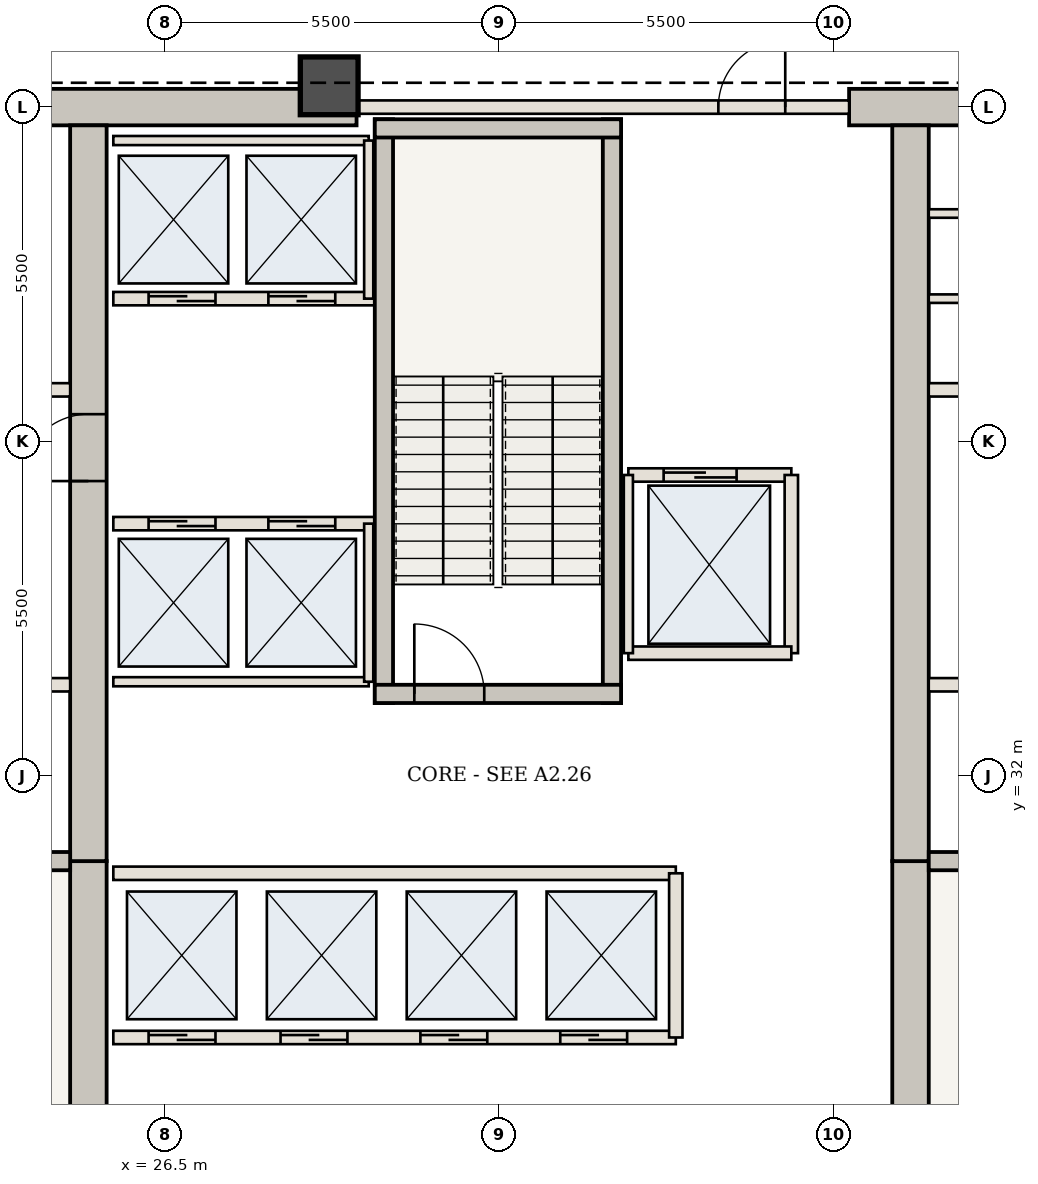
"""IFC4 building model, lengths in metres.
Left out: names, types, materials, properties, quantities, classifications, styles, units other than length and angle.
Written with IfcOpenShell. Run it as: python <this file> out.ifc"""

import sys

from ifc_helpers import new_model, si_unit, direction, frame, frame_2d, origin, origin_2d, place, context, subcontext, project, spatial, rectangle, extrude, element, fill, save


model = new_model("IFC4")
c1 = context("Model", 3, precision=1e-05, world=origin(), true_north=direction((0.0, 1.0)))
c2 = subcontext(c1, "Body", "Model", "MODEL_VIEW")
j1 = project(units=[si_unit("LENGTHUNIT", "METRE"), si_unit("PLANEANGLEUNIT", "RADIAN")], contexts=[c1])
p1 = place(None, origin())
s1 = spatial("IfcSite", under=j1, at=p1, CompositionType="ELEMENT")
p2 = place(p1, origin())
s2 = spatial("IfcBuilding", under=s1, at=p2, CompositionType="ELEMENT")
p3 = place(p2, frame((0.0, 0.0, 106.05)))
s3 = spatial("IfcBuildingStorey", under=s2, at=p3, CompositionType="ELEMENT", Elevation=106.05)
p4 = place(p3, frame((21.41, 43.0, 0.0), z_axis=(0.0, 0.0, 1.0), x_axis=(1.0, 0.0, 0.0)))
e1 = element("IfcWall", 1, at=p4, inside=s3, PredefinedType="SHEAR", context=c2, shape_type="SweptSolid", body=[
    extrude(rectangle(XDim=8.24, YDim=0.6, at=frame_2d((4.12, 0.0))), origin(), (0.0, 0.0, 1.0), 4.55),
])
p5 = place(p3, frame((37.75, 43.0, 0.0), z_axis=(0.0, 0.0, 1.0), x_axis=(1.0, 0.0, 0.0)))
e2 = element("IfcWall", 2, at=p5, inside=s3, PredefinedType="SHEAR", context=c2, shape_type="SweptSolid", body=[
    extrude(rectangle(XDim=4.84, YDim=0.6, at=frame_2d((2.42, 0.0))), origin(), (0.0, 0.0, 1.0), 4.55),
])
p6 = place(p3, frame((25.24, 21.25, 0.0), z_axis=(0.0, 0.0, 1.0), x_axis=(0.0, 1.0, 0.0)))
e3 = element("IfcWall", 3, at=p6, inside=s3, PredefinedType="SHEAR", context=c2, shape_type="SweptSolid", body=[
    extrude(rectangle(XDim=9.35, YDim=0.6, at=frame_2d((4.675, 0.0))), origin(), (0.0, 0.0, 1.0), 4.55),
])
p7 = place(p3, frame((25.24, 30.6, 0.0), z_axis=(0.0, 0.0, 1.0), x_axis=(0.0, 1.0, 0.0)))
e4 = element("IfcWall", 4, at=p7, inside=s3, PredefinedType="SHEAR", context=c2, shape_type="SweptSolid", body=[
    extrude(rectangle(XDim=12.1, YDim=0.6, at=frame_2d((6.05, 0.0))), origin(), (0.0, 0.0, 1.0), 4.55),
])
p8 = place(p7, frame((6.25, 0.0, 0.0)))
e5 = element("IfcOpeningElement", 5, at=p8, cuts=e4, PredefinedType="OPENING", context=c2, shape_type="SweptSolid", body=[
    extrude(rectangle(XDim=1.1, YDim=2.15, at=frame_2d((0.55, 1.075))), frame((0.0, 0.31, 0.0), z_axis=(0.0, -1.0, 0.0), x_axis=(1.0, 0.0, 0.0)), (0.0, 0.0, 1.0), 0.62),
])
p9 = place(p3, frame((38.76, 21.25, 0.0), z_axis=(0.0, 0.0, 1.0), x_axis=(0.0, 1.0, 0.0)))
e6 = element("IfcWall", 6, at=p9, inside=s3, PredefinedType="SHEAR", context=c2, shape_type="SweptSolid", body=[
    extrude(rectangle(XDim=9.35, YDim=0.6, at=frame_2d((4.675, 0.0))), origin(), (0.0, 0.0, 1.0), 4.55),
])
p10 = place(p3, frame((38.76, 30.6, 0.0), z_axis=(0.0, 0.0, 1.0), x_axis=(0.0, 1.0, 0.0)))
e7 = element("IfcWall", 7, at=p10, inside=s3, PredefinedType="SHEAR", context=c2, shape_type="SweptSolid", body=[
    extrude(rectangle(XDim=12.1, YDim=0.6, at=frame_2d((6.05, 0.0))), origin(), (0.0, 0.0, 1.0), 4.55),
])
p11 = place(p3, frame((29.2, 43.35, 0.0), z_axis=(0.0, 0.0, 1.0), x_axis=(1.0, 0.0, 0.0)))
e8 = element("IfcColumn", 8, at=p11, inside=s3, PredefinedType="COLUMN", context=c2, shape_type="SweptSolid", body=[
    extrude(rectangle(XDim=0.95, YDim=0.95, at=origin_2d()), origin(), (0.0, 0.0, 1.0), 4.55),
])
for number, where, z_axis, x_axis in (
    (9, (21.41, 30.6, 0.0), (0.0, 0.0, 1.0), (1.0, 0.0, 0.0)),
    (10, (39.06, 30.6, 0.0), (0.0, 0.0, 1.0), (1.0, 0.0, 0.0)),
):
    element("IfcWall", number, at=place(p3, frame(where, z_axis=z_axis, x_axis=x_axis)), inside=s3, PredefinedType="SHEAR", context=c2, shape_type="SweptSolid", body=[
        extrude(rectangle(XDim=3.53, YDim=0.3, at=frame_2d((1.765, 0.0))), origin(), (0.0, 0.0, 1.0), 4.13),
    ])
p12 = place(p3, frame((21.41, 33.5, 0.0), z_axis=(0.0, 0.0, 1.0), x_axis=(1.0, 0.0, 0.0)))
e11 = element("IfcWall", 11, at=p12, inside=s3, PredefinedType="STANDARD", context=c2, shape_type="SweptSolid", body=[
    extrude(rectangle(XDim=3.53, YDim=0.22, at=frame_2d((1.765, 0.0))), origin(), (0.0, 0.0, 1.0), 4.13),
])
p13 = place(p12, frame((0.75, 0.0, 0.0)))
e12 = element("IfcOpeningElement", 12, at=p13, cuts=e11, PredefinedType="OPENING", context=c2, shape_type="SweptSolid", body=[
    extrude(rectangle(XDim=1.2, YDim=2.2, at=frame_2d((0.6, 1.1))), frame((0.0, 0.12, 0.0), z_axis=(0.0, -1.0, 0.0), x_axis=(1.0, 0.0, 0.0)), (0.0, 0.0, 1.0), 0.24),
])
p14 = place(p3, frame((39.06, 33.5, 0.0), z_axis=(0.0, 0.0, 1.0), x_axis=(1.0, 0.0, 0.0)))
e13 = element("IfcWall", 13, at=p14, inside=s3, PredefinedType="STANDARD", context=c2, shape_type="SweptSolid", body=[
    extrude(rectangle(XDim=3.53, YDim=0.22, at=frame_2d((1.765, 0.0))), origin(), (0.0, 0.0, 1.0), 4.13),
])
p15 = place(p14, frame((1.55, 0.0, 0.0)))
e14 = element("IfcOpeningElement", 14, at=p15, cuts=e13, PredefinedType="OPENING", context=c2, shape_type="SweptSolid", body=[
    extrude(rectangle(XDim=1.2, YDim=2.2, at=frame_2d((0.6, 1.1))), frame((0.0, 0.12, 0.0), z_axis=(0.0, -1.0, 0.0), x_axis=(1.0, 0.0, 0.0)), (0.0, 0.0, 1.0), 0.24),
])
for number, where, z_axis, x_axis in (
    (15, (21.41, 38.35, 0.0), (0.0, 0.0, 1.0), (1.0, 0.0, 0.0)),
    (16, (39.06, 38.35, 0.0), (0.0, 0.0, 1.0), (1.0, 0.0, 0.0)),
):
    element("IfcWall", number, at=place(p3, frame(where, z_axis=z_axis, x_axis=x_axis)), inside=s3, PredefinedType="STANDARD", context=c2, shape_type="SweptSolid", body=[
        extrude(rectangle(XDim=3.53, YDim=0.22, at=frame_2d((1.765, 0.0))), origin(), (0.0, 0.0, 1.0), 4.13),
    ])
for number, where, z_axis, x_axis in (
    (17, (39.06, 39.85, 0.0), (0.0, 0.0, 1.0), (1.0, 0.0, 0.0)),
    (18, (39.06, 41.25, 0.0), (0.0, 0.0, 1.0), (1.0, 0.0, 0.0)),
):
    element("IfcWall", number, at=place(p3, frame(where, z_axis=z_axis, x_axis=x_axis)), inside=s3, PredefinedType="STANDARD", context=c2, shape_type="SweptSolid", body=[
        extrude(rectangle(XDim=3.53, YDim=0.14, at=frame_2d((1.765, 0.0))), origin(), (0.0, 0.0, 1.0), 4.13),
    ])
p16 = place(p3, frame((25.65, 27.7, 0.0), z_axis=(0.0, 0.0, 1.0), x_axis=(1.0, 0.0, 0.0)))
e19 = element("IfcWall", 19, at=p16, inside=s3, PredefinedType="STANDARD", context=c2, shape_type="SweptSolid", body=[
    extrude(rectangle(XDim=9.25, YDim=0.22, at=frame_2d((4.625, 0.0))), origin(), (0.0, 0.0, 1.0), 4.13),
])
p17 = place(p16, frame((0.58, 0.0, 0.0)))
e20 = element("IfcOpeningElement", 20, at=p17, cuts=e19, PredefinedType="OPENING", context=c2, shape_type="SweptSolid", body=[
    extrude(rectangle(XDim=1.1, YDim=2.15, at=frame_2d((0.55, 1.075))), frame((0.0, 0.12, 0.0), z_axis=(0.0, -1.0, 0.0), x_axis=(1.0, 0.0, 0.0)), (0.0, 0.0, 1.0), 0.24),
])
p18 = place(p16, frame((2.75, 0.0, 0.0)))
e21 = element("IfcOpeningElement", 21, at=p18, cuts=e19, PredefinedType="OPENING", context=c2, shape_type="SweptSolid", body=[
    extrude(rectangle(XDim=1.1, YDim=2.15, at=frame_2d((0.55, 1.075))), frame((0.0, 0.12, 0.0), z_axis=(0.0, -1.0, 0.0), x_axis=(1.0, 0.0, 0.0)), (0.0, 0.0, 1.0), 0.24),
])
p19 = place(p16, frame((5.05, 0.0, 0.0)))
e22 = element("IfcOpeningElement", 22, at=p19, cuts=e19, PredefinedType="OPENING", context=c2, shape_type="SweptSolid", body=[
    extrude(rectangle(XDim=1.1, YDim=2.15, at=frame_2d((0.55, 1.075))), frame((0.0, 0.12, 0.0), z_axis=(0.0, -1.0, 0.0), x_axis=(1.0, 0.0, 0.0)), (0.0, 0.0, 1.0), 0.24),
])
p20 = place(p16, frame((7.35, 0.0, 0.0)))
e23 = element("IfcOpeningElement", 23, at=p20, cuts=e19, PredefinedType="OPENING", context=c2, shape_type="SweptSolid", body=[
    extrude(rectangle(XDim=1.1, YDim=2.15, at=frame_2d((0.55, 1.075))), frame((0.0, 0.12, 0.0), z_axis=(0.0, -1.0, 0.0), x_axis=(1.0, 0.0, 0.0)), (0.0, 0.0, 1.0), 0.24),
])
p21 = place(p3, frame((25.65, 30.4, 0.0), z_axis=(0.0, 0.0, 1.0), x_axis=(1.0, 0.0, 0.0)))
e24 = element("IfcWall", 24, at=p21, inside=s3, PredefinedType="STANDARD", context=c2, shape_type="SweptSolid", body=[
    extrude(rectangle(XDim=9.25, YDim=0.22, at=frame_2d((4.625, 0.0))), origin(), (0.0, 0.0, 1.0), 4.13),
])
p22 = place(p3, frame((34.9, 27.7, 0.0), z_axis=(0.0, 0.0, 1.0), x_axis=(0.0, 1.0, 0.0)))
e25 = element("IfcWall", 25, at=p22, inside=s3, PredefinedType="STANDARD", context=c2, shape_type="SweptSolid", body=[
    extrude(rectangle(XDim=2.7, YDim=0.22, at=frame_2d((1.35, 0.0))), origin(), (0.0, 0.0, 1.0), 4.13),
])
p23 = place(p3, frame((25.65, 36.15, 0.0), z_axis=(0.0, 0.0, 1.0), x_axis=(1.0, 0.0, 0.0)))
e26 = element("IfcWall", 26, at=p23, inside=s3, PredefinedType="STANDARD", context=c2, shape_type="SweptSolid", body=[
    extrude(rectangle(XDim=4.3, YDim=0.22, at=frame_2d((2.15, 0.0))), origin(), (0.0, 0.0, 1.0), 4.13),
])
p24 = place(p23, frame((0.58, 0.0, 0.0)))
e27 = element("IfcOpeningElement", 27, at=p24, cuts=e26, PredefinedType="OPENING", context=c2, shape_type="SweptSolid", body=[
    extrude(rectangle(XDim=1.1, YDim=2.15, at=frame_2d((0.55, 1.075))), frame((0.0, 0.12, 0.0), z_axis=(0.0, -1.0, 0.0), x_axis=(1.0, 0.0, 0.0)), (0.0, 0.0, 1.0), 0.24),
])
p25 = place(p23, frame((2.55, 0.0, 0.0)))
e28 = element("IfcOpeningElement", 28, at=p25, cuts=e26, PredefinedType="OPENING", context=c2, shape_type="SweptSolid", body=[
    extrude(rectangle(XDim=1.1, YDim=2.15, at=frame_2d((0.55, 1.075))), frame((0.0, 0.12, 0.0), z_axis=(0.0, -1.0, 0.0), x_axis=(1.0, 0.0, 0.0)), (0.0, 0.0, 1.0), 0.24),
])
p26 = place(p3, frame((25.65, 33.55, 0.0), z_axis=(0.0, 0.0, 1.0), x_axis=(1.0, 0.0, 0.0)))
e29 = element("IfcWall", 29, at=p26, inside=s3, PredefinedType="STANDARD", context=c2, shape_type="SweptSolid", body=[
    extrude(rectangle(XDim=4.2, YDim=0.15, at=frame_2d((2.1, 0.0))), origin(), (0.0, 0.0, 1.0), 4.13),
])
p27 = place(p3, frame((29.85, 33.55, 0.0), z_axis=(0.0, 0.0, 1.0), x_axis=(0.0, 1.0, 0.0)))
e30 = element("IfcWall", 30, at=p27, inside=s3, PredefinedType="STANDARD", context=c2, shape_type="SweptSolid", body=[
    extrude(rectangle(XDim=2.6, YDim=0.15, at=frame_2d((1.3, 0.0))), origin(), (0.0, 0.0, 1.0), 4.13),
])
p28 = place(p3, frame((25.65, 39.85, 0.0), z_axis=(0.0, 0.0, 1.0), x_axis=(1.0, 0.0, 0.0)))
e31 = element("IfcWall", 31, at=p28, inside=s3, PredefinedType="STANDARD", context=c2, shape_type="SweptSolid", body=[
    extrude(rectangle(XDim=4.3, YDim=0.22, at=frame_2d((2.15, 0.0))), origin(), (0.0, 0.0, 1.0), 4.13),
])
p29 = place(p28, frame((0.58, 0.0, 0.0)))
e32 = element("IfcOpeningElement", 32, at=p29, cuts=e31, PredefinedType="OPENING", context=c2, shape_type="SweptSolid", body=[
    extrude(rectangle(XDim=1.1, YDim=2.15, at=frame_2d((0.55, 1.075))), frame((0.0, 0.12, 0.0), z_axis=(0.0, -1.0, 0.0), x_axis=(1.0, 0.0, 0.0)), (0.0, 0.0, 1.0), 0.24),
])
p30 = place(p28, frame((2.55, 0.0, 0.0)))
e33 = element("IfcOpeningElement", 33, at=p30, cuts=e31, PredefinedType="OPENING", context=c2, shape_type="SweptSolid", body=[
    extrude(rectangle(XDim=1.1, YDim=2.15, at=frame_2d((0.55, 1.075))), frame((0.0, 0.12, 0.0), z_axis=(0.0, -1.0, 0.0), x_axis=(1.0, 0.0, 0.0)), (0.0, 0.0, 1.0), 0.24),
])
p31 = place(p3, frame((25.65, 42.45, 0.0), z_axis=(0.0, 0.0, 1.0), x_axis=(1.0, 0.0, 0.0)))
e34 = element("IfcWall", 34, at=p31, inside=s3, PredefinedType="STANDARD", context=c2, shape_type="SweptSolid", body=[
    extrude(rectangle(XDim=4.2, YDim=0.15, at=frame_2d((2.1, 0.0))), origin(), (0.0, 0.0, 1.0), 4.13),
])
p32 = place(p3, frame((29.85, 39.85, 0.0), z_axis=(0.0, 0.0, 1.0), x_axis=(0.0, 1.0, 0.0)))
e35 = element("IfcWall", 35, at=p32, inside=s3, PredefinedType="STANDARD", context=c2, shape_type="SweptSolid", body=[
    extrude(rectangle(XDim=2.6, YDim=0.15, at=frame_2d((1.3, 0.0))), origin(), (0.0, 0.0, 1.0), 4.13),
])
for number, where, z_axis, x_axis in (
    (36, (30.1, 33.2, 0.0), (0.0, 0.0, 1.0), (0.0, 1.0, 0.0)),
    (37, (33.85, 33.2, 0.0), (0.0, 0.0, 1.0), (0.0, 1.0, 0.0)),
):
    element("IfcWall", number, at=place(p3, frame(where, z_axis=z_axis, x_axis=x_axis)), inside=s3, PredefinedType="SHEAR", context=c2, shape_type="SweptSolid", body=[
        extrude(rectangle(XDim=9.6, YDim=0.3, at=frame_2d((4.8, 0.0))), origin(), (0.0, 0.0, 1.0), 4.13),
    ])
p33 = place(p3, frame((29.95, 33.35, 0.0), z_axis=(0.0, 0.0, 1.0), x_axis=(1.0, 0.0, 0.0)))
e38 = element("IfcWall", 38, at=p33, inside=s3, PredefinedType="SHEAR", context=c2, shape_type="SweptSolid", body=[
    extrude(rectangle(XDim=4.05, YDim=0.3, at=frame_2d((2.025, 0.0))), origin(), (0.0, 0.0, 1.0), 4.13),
])
p34 = place(p33, frame((0.65, 0.0, 0.0)))
e39 = element("IfcOpeningElement", 39, at=p34, cuts=e38, PredefinedType="OPENING", context=c2, shape_type="SweptSolid", body=[
    extrude(rectangle(XDim=1.15, YDim=2.15, at=frame_2d((0.575, 1.075))), frame((0.0, 0.16, 0.0), z_axis=(0.0, -1.0, 0.0), x_axis=(1.0, 0.0, 0.0)), (0.0, 0.0, 1.0), 0.32),
])
p35 = place(p3, frame((29.95, 42.65, 0.0), z_axis=(0.0, 0.0, 1.0), x_axis=(1.0, 0.0, 0.0)))
e40 = element("IfcWall", 40, at=p35, inside=s3, PredefinedType="SHEAR", context=c2, shape_type="SweptSolid", body=[
    extrude(rectangle(XDim=4.05, YDim=0.3, at=frame_2d((2.025, 0.0))), origin(), (0.0, 0.0, 1.0), 4.13),
])
p36 = place(p3, frame((29.65, 43.0, 0.0), z_axis=(0.0, 0.0, 1.0), x_axis=(1.0, 0.0, 0.0)))
e41 = element("IfcWall", 41, at=p36, inside=s3, PredefinedType="STANDARD", context=c2, shape_type="SweptSolid", body=[
    extrude(rectangle(XDim=8.1, YDim=0.22, at=frame_2d((4.05, 0.0))), origin(), (0.0, 0.0, 1.0), 4.13),
])
p37 = place(p36, frame((5.95, 0.0, 0.0)))
e42 = element("IfcOpeningElement", 42, at=p37, cuts=e41, PredefinedType="OPENING", context=c2, shape_type="SweptSolid", body=[
    extrude(rectangle(XDim=1.1, YDim=2.15, at=frame_2d((0.55, 1.075))), frame((0.0, 0.12, 0.0), z_axis=(0.0, -1.0, 0.0), x_axis=(1.0, 0.0, 0.0)), (0.0, 0.0, 1.0), 0.24),
])
p38 = place(p3, frame((34.12, 36.95, 0.0), z_axis=(0.0, 0.0, 1.0), x_axis=(1.0, 0.0, 0.0)))
e43 = element("IfcWall", 43, at=p38, inside=s3, PredefinedType="STANDARD", context=c2, shape_type="SweptSolid", body=[
    extrude(rectangle(XDim=2.68, YDim=0.22, at=frame_2d((1.34, 0.0))), origin(), (0.0, 0.0, 1.0), 4.13),
])
p39 = place(p38, frame((0.58, 0.0, 0.0)))
e44 = element("IfcOpeningElement", 44, at=p39, cuts=e43, PredefinedType="OPENING", context=c2, shape_type="SweptSolid", body=[
    extrude(rectangle(XDim=1.2, YDim=2.2, at=frame_2d((0.6, 1.1))), frame((0.0, 0.12, 0.0), z_axis=(0.0, -1.0, 0.0), x_axis=(1.0, 0.0, 0.0)), (0.0, 0.0, 1.0), 0.24),
])
p40 = place(p3, frame((36.8, 34.02, 0.0), z_axis=(0.0, 0.0, 1.0), x_axis=(0.0, 1.0, 0.0)))
e45 = element("IfcWall", 45, at=p40, inside=s3, PredefinedType="STANDARD", context=c2, shape_type="SweptSolid", body=[
    extrude(rectangle(XDim=2.93, YDim=0.22, at=frame_2d((1.465, 0.0))), origin(), (0.0, 0.0, 1.0), 4.13),
])
p41 = place(p3, frame((34.12, 34.02, 0.0), z_axis=(0.0, 0.0, 1.0), x_axis=(1.0, 0.0, 0.0)))
e46 = element("IfcWall", 46, at=p41, inside=s3, PredefinedType="STANDARD", context=c2, shape_type="SweptSolid", body=[
    extrude(rectangle(XDim=2.68, YDim=0.22, at=frame_2d((1.34, 0.0))), origin(), (0.0, 0.0, 1.0), 4.13),
])
p42 = place(p3, frame((34.12, 34.02, 0.0), z_axis=(0.0, 0.0, 1.0), x_axis=(0.0, 1.0, 0.0)))
e47 = element("IfcWall", 47, at=p42, inside=s3, PredefinedType="STANDARD", context=c2, shape_type="SweptSolid", body=[
    extrude(rectangle(XDim=2.93, YDim=0.15, at=frame_2d((1.465, 0.0))), origin(), (0.0, 0.0, 1.0), 4.13),
])
p43 = place(p8, origin())
e48 = element("IfcDoor", 48, at=p43, inside=s3, OperationType="SINGLE_SWING_LEFT", PredefinedType="DOOR", context=c2, shape_type="SweptSolid", body=[
    extrude(rectangle(XDim=1.1, YDim=2.15, at=frame_2d((0.55, 1.075))), frame((0.0, 0.025, 0.0), z_axis=(0.0, -1.0, 0.0), x_axis=(1.0, 0.0, 0.0)), (0.0, 0.0, 1.0), 0.05),
])
fill(e5, e48)
p44 = place(p17, origin())
e49 = element("IfcDoor", 49, at=p44, inside=s3, OperationType="DOUBLE_DOOR_SLIDING", PredefinedType="DOOR", context=c2, shape_type="SweptSolid", body=[
    extrude(rectangle(XDim=1.1, YDim=2.15, at=frame_2d((0.55, 1.075))), frame((0.0, 0.025, 0.0), z_axis=(0.0, -1.0, 0.0), x_axis=(1.0, 0.0, 0.0)), (0.0, 0.0, 1.0), 0.05),
])
fill(e20, e49)
p45 = place(p18, origin())
e50 = element("IfcDoor", 50, at=p45, inside=s3, OperationType="DOUBLE_DOOR_SLIDING", PredefinedType="DOOR", context=c2, shape_type="SweptSolid", body=[
    extrude(rectangle(XDim=1.1, YDim=2.15, at=frame_2d((0.55, 1.075))), frame((0.0, 0.025, 0.0), z_axis=(0.0, -1.0, 0.0), x_axis=(1.0, 0.0, 0.0)), (0.0, 0.0, 1.0), 0.05),
])
fill(e21, e50)
p46 = place(p19, origin())
e51 = element("IfcDoor", 51, at=p46, inside=s3, OperationType="DOUBLE_DOOR_SLIDING", PredefinedType="DOOR", context=c2, shape_type="SweptSolid", body=[
    extrude(rectangle(XDim=1.1, YDim=2.15, at=frame_2d((0.55, 1.075))), frame((0.0, 0.025, 0.0), z_axis=(0.0, -1.0, 0.0), x_axis=(1.0, 0.0, 0.0)), (0.0, 0.0, 1.0), 0.05),
])
fill(e22, e51)
p47 = place(p20, origin())
e52 = element("IfcDoor", 52, at=p47, inside=s3, OperationType="DOUBLE_DOOR_SLIDING", PredefinedType="DOOR", context=c2, shape_type="SweptSolid", body=[
    extrude(rectangle(XDim=1.1, YDim=2.15, at=frame_2d((0.55, 1.075))), frame((0.0, 0.025, 0.0), z_axis=(0.0, -1.0, 0.0), x_axis=(1.0, 0.0, 0.0)), (0.0, 0.0, 1.0), 0.05),
])
fill(e23, e52)
p48 = place(p24, origin())
e53 = element("IfcDoor", 53, at=p48, inside=s3, OperationType="DOUBLE_DOOR_SLIDING", PredefinedType="DOOR", context=c2, shape_type="SweptSolid", body=[
    extrude(rectangle(XDim=1.1, YDim=2.15, at=frame_2d((0.55, 1.075))), frame((0.0, 0.025, 0.0), z_axis=(0.0, -1.0, 0.0), x_axis=(1.0, 0.0, 0.0)), (0.0, 0.0, 1.0), 0.05),
])
fill(e27, e53)
p49 = place(p25, origin())
e54 = element("IfcDoor", 54, at=p49, inside=s3, OperationType="DOUBLE_DOOR_SLIDING", PredefinedType="DOOR", context=c2, shape_type="SweptSolid", body=[
    extrude(rectangle(XDim=1.1, YDim=2.15, at=frame_2d((0.55, 1.075))), frame((0.0, 0.025, 0.0), z_axis=(0.0, -1.0, 0.0), x_axis=(1.0, 0.0, 0.0)), (0.0, 0.0, 1.0), 0.05),
])
fill(e28, e54)
p50 = place(p29, origin())
e55 = element("IfcDoor", 55, at=p50, inside=s3, OperationType="DOUBLE_DOOR_SLIDING", PredefinedType="DOOR", context=c2, shape_type="SweptSolid", body=[
    extrude(rectangle(XDim=1.1, YDim=2.15, at=frame_2d((0.55, 1.075))), frame((0.0, 0.025, 0.0), z_axis=(0.0, -1.0, 0.0), x_axis=(1.0, 0.0, 0.0)), (0.0, 0.0, 1.0), 0.05),
])
fill(e32, e55)
p51 = place(p30, origin())
e56 = element("IfcDoor", 56, at=p51, inside=s3, OperationType="DOUBLE_DOOR_SLIDING", PredefinedType="DOOR", context=c2, shape_type="SweptSolid", body=[
    extrude(rectangle(XDim=1.1, YDim=2.15, at=frame_2d((0.55, 1.075))), frame((0.0, 0.025, 0.0), z_axis=(0.0, -1.0, 0.0), x_axis=(1.0, 0.0, 0.0)), (0.0, 0.0, 1.0), 0.05),
])
fill(e33, e56)
p52 = place(p34, origin())
e57 = element("IfcDoor", 57, at=p52, inside=s3, OperationType="SINGLE_SWING_LEFT", PredefinedType="DOOR", context=c2, shape_type="SweptSolid", body=[
    extrude(rectangle(XDim=1.15, YDim=2.15, at=frame_2d((0.575, 1.075))), frame((0.0, 0.025, 0.0), z_axis=(0.0, -1.0, 0.0), x_axis=(1.0, 0.0, 0.0)), (0.0, 0.0, 1.0), 0.05),
])
fill(e39, e57)
p53 = place(p37, origin())
e58 = element("IfcDoor", 58, at=p53, inside=s3, OperationType="SINGLE_SWING_RIGHT", PredefinedType="DOOR", context=c2, shape_type="SweptSolid", body=[
    extrude(rectangle(XDim=1.1, YDim=2.15, at=frame_2d((0.55, 1.075))), frame((0.0, 0.025, 0.0), z_axis=(0.0, -1.0, 0.0), x_axis=(1.0, 0.0, 0.0)), (0.0, 0.0, 1.0), 0.05),
])
fill(e42, e58)
p54 = place(p39, origin())
e59 = element("IfcDoor", 59, at=p54, inside=s3, OperationType="DOUBLE_DOOR_SLIDING", PredefinedType="DOOR", context=c2, shape_type="SweptSolid", body=[
    extrude(rectangle(XDim=1.2, YDim=2.2, at=frame_2d((0.6, 1.1))), frame((0.0, 0.025, 0.0), z_axis=(0.0, -1.0, 0.0), x_axis=(1.0, 0.0, 0.0)), (0.0, 0.0, 1.0), 0.05),
])
fill(e44, e59)
save(model, sys.argv[1])
